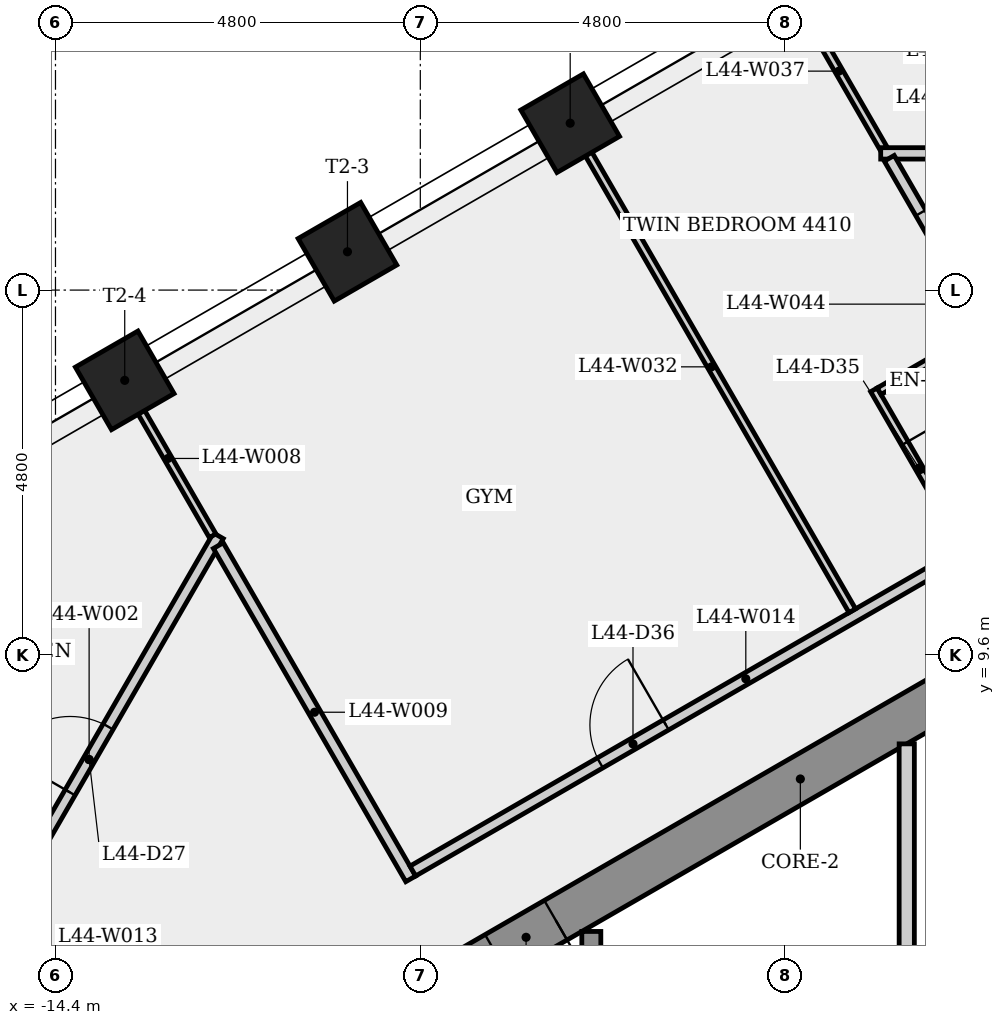
"""IFC4 building model, lengths in metres.
Left out: names, types, materials, properties, quantities, classifications, styles, units other than length and angle.
Written with IfcOpenShell. Run it as: python <this file> out.ifc"""

import sys

from ifc_helpers import new_model, si_unit, direction, frame, frame_2d, origin, origin_2d, place, context, subcontext, project, spatial, rectangle, extrude, element, fill, save


model = new_model("IFC4")
c1 = context("Model", 3, precision=1e-05, world=origin(), true_north=direction((0.0, 1.0)))
c2 = subcontext(c1, "Body", "Model", "MODEL_VIEW")
j1 = project(units=[si_unit("LENGTHUNIT", "METRE"), si_unit("PLANEANGLEUNIT", "RADIAN")], contexts=[c1])
p1 = place(None, origin())
s1 = spatial("IfcSite", under=j1, at=p1, CompositionType="ELEMENT")
p2 = place(p1, origin())
s2 = spatial("IfcBuilding", under=s1, at=p2, CompositionType="ELEMENT")
p3 = place(p2, frame((0.0, 0.0, 166.3)))
s3 = spatial("IfcBuildingStorey", under=s2, at=p3, CompositionType="ELEMENT", Elevation=166.3)
p4 = place(p3, frame((0.15, 10.71, 0.0), z_axis=(0.0, 0.0, 1.0), x_axis=(-0.866023993627, -0.500002442456, 0.0)))
e1 = element("IfcWall", 1, at=p4, inside=s3, PredefinedType="SHEAR", context=c2, shape_type="SweptSolid", body=[
    extrude(rectangle(XDim=10.97, YDim=0.6, at=frame_2d((5.485, 0.0))), origin(), (0.0, 0.0, 1.0), 3.4),
])
p5 = place(p4, frame((9.201, 0.0, 0.0)))
e2 = element("IfcOpeningElement", 2, at=p5, cuts=e1, PredefinedType="OPENING", context=c2, shape_type="SweptSolid", body=[
    extrude(rectangle(XDim=0.9, YDim=2.1, at=frame_2d((0.45, 1.05))), frame((0.0, 0.31, 0.0), z_axis=(0.0, -1.0, 0.0), x_axis=(1.0, 0.0, 0.0)), (0.0, 0.0, 1.0), 0.62),
])
p6 = place(p4, frame((1.744, 0.0, 0.0)))
e3 = element("IfcOpeningElement", 3, at=p6, cuts=e1, PredefinedType="OPENING", context=c2, shape_type="SweptSolid", body=[
    extrude(rectangle(XDim=0.9, YDim=2.1, at=frame_2d((0.45, 1.05))), frame((0.0, 0.31, 0.0), z_axis=(0.0, -1.0, 0.0), x_axis=(1.0, 0.0, 0.0)), (0.0, 0.0, 1.0), 0.62),
])
for number, where, z_axis, x_axis in (
    (4, (-7.628, 16.596, 0.0), (0.0, 0.0, 1.0), (-0.5, 0.866, 0.0)),
    (5, (-10.559, 14.904, 0.0), (0.0, 0.0, 1.0), (-0.5, 0.866, 0.0)),
    (6, (-13.489, 13.212, 0.0), (0.0, 0.0, 1.0), (-0.5, 0.866, 0.0)),
):
    element("IfcColumn", number, at=place(p3, frame(where, z_axis=z_axis, x_axis=x_axis)), inside=s3, PredefinedType="COLUMN", context=c2, shape_type="SweptSolid", body=[
        extrude(rectangle(XDim=0.95, YDim=0.95, at=origin_2d()), origin(), (0.0, 0.0, 1.0), 3.4),
    ])
p7 = place(p3, frame((-15.657, 5.278, 0.0), z_axis=(0.0, 0.0, 1.0), x_axis=(0.499988676607, 0.86603194125, 0.0)))
e7 = element("IfcWall", 7, at=p7, inside=s3, PredefinedType="PARTITIONING", context=c2, shape_type="SweptSolid", body=[
    extrude(rectangle(XDim=6.801, YDim=0.15, at=frame_2d((3.4, 0.0))), origin(), (0.0, 0.0, 1.0), 3.05),
])
p8 = place(p7, frame((2.9, 0.0, 0.0)))
e8 = element("IfcOpeningElement", 8, at=p8, cuts=e7, PredefinedType="OPENING", context=c2, shape_type="SweptSolid", body=[
    extrude(rectangle(XDim=1.0, YDim=2.1, at=frame_2d((0.5, 1.05))), frame((0.0, 0.085, 0.0), z_axis=(0.0, -1.0, 0.0), x_axis=(1.0, 0.0, 0.0)), (0.0, 0.0, 1.0), 0.17),
])
p9 = place(p3, frame((-13.507, 13.202, 0.0), z_axis=(0.0, 0.0, 1.0), x_axis=(0.499995339376, -0.86602809458, 0.0)))
e9 = element("IfcWall", 9, at=p9, inside=s3, PredefinedType="PARTITIONING", context=c2, shape_type="SweptSolid", body=[
    extrude(rectangle(XDim=2.349, YDim=0.1, at=frame_2d((1.175, 0.0))), origin(), (0.0, 0.0, 1.0), 3.05),
])
p10 = place(p3, frame((-12.257, 11.038, 0.0), z_axis=(0.0, 0.0, 1.0), x_axis=(0.499997969693, -0.866026575979, 0.0)))
e10 = element("IfcWall", 10, at=p10, inside=s3, PredefinedType="PARTITIONING", context=c2, shape_type="SweptSolid", body=[
    extrude(rectangle(XDim=5.062, YDim=0.15, at=frame_2d((2.531, 0.0))), origin(), (0.0, 0.0, 1.0), 3.05),
])
p11 = place(p3, frame((-9.698, 6.756, 0.0), z_axis=(0.0, 0.0, 1.0), x_axis=(0.866026460776, 0.499998169232, 0.0)))
e11 = element("IfcWall", 11, at=p11, inside=s3, PredefinedType="PARTITIONING", context=c2, shape_type="SweptSolid", body=[
    extrude(rectangle(XDim=10.118, YDim=0.15, at=frame_2d((5.059, 0.0))), origin(), (0.0, 0.0, 1.0), 3.05),
])
p12 = place(p11, frame((2.845, 0.0, 0.0)))
e12 = element("IfcOpeningElement", 12, at=p12, cuts=e11, PredefinedType="OPENING", context=c2, shape_type="SweptSolid", body=[
    extrude(rectangle(XDim=1.0, YDim=2.1, at=frame_2d((0.5, 1.05))), frame((0.0, 0.085, 0.0), z_axis=(0.0, -1.0, 0.0), x_axis=(1.0, 0.0, 0.0)), (0.0, 0.0, 1.0), 0.17),
])
p13 = place(p3, frame((-7.35, 1.925, 0.0), z_axis=(0.0, 0.0, 1.0), x_axis=(0.0, 1.0, 0.0)))
e13 = element("IfcWall", 13, at=p13, inside=s3, PredefinedType="SHEAR", context=c2, shape_type="SweptSolid", body=[
    extrude(rectangle(XDim=4.036, YDim=0.25, at=frame_2d((2.018, 0.0))), origin(), (0.0, 0.0, 1.0), 3.05),
])
p14 = place(p3, frame((-3.916, 10.181, 0.0), z_axis=(0.0, 0.0, 1.0), x_axis=(-0.500011399757, 0.866018822032, 0.0)))
e14 = element("IfcWall", 14, at=p14, inside=s3, PredefinedType="PARTITIONING", context=c2, shape_type="SweptSolid", body=[
    extrude(rectangle(XDim=7.411, YDim=0.1, at=frame_2d((3.706, 0.0))), origin(), (0.0, 0.0, 1.0), 3.05),
])
p15 = place(p3, frame((-3.632, 13.088, 0.0), z_axis=(0.0, 0.0, 1.0), x_axis=(0.499986429846, -0.866033238375, 0.0)))
e15 = element("IfcWall", 15, at=p15, inside=s3, PredefinedType="PARTITIONING", context=c2, shape_type="SweptSolid", body=[
    extrude(rectangle(XDim=2.375, YDim=0.1, at=frame_2d((1.188, 0.0))), origin(), (0.0, 0.0, 1.0), 3.05),
])
p16 = place(p15, frame((0.812, 0.0, 0.0)))
e16 = element("IfcOpeningElement", 16, at=p16, cuts=e15, PredefinedType="OPENING", context=c2, shape_type="SweptSolid", body=[
    extrude(rectangle(XDim=0.8, YDim=2.1, at=frame_2d((0.4, 1.05))), frame((0.0, 0.06, 0.0), z_axis=(0.0, -1.0, 0.0), x_axis=(1.0, 0.0, 0.0)), (0.0, 0.0, 1.0), 0.12),
])
p17 = place(p3, frame((-3.505, 16.264, 0.0), z_axis=(0.0, 0.0, 1.0), x_axis=(-0.500040344412, 0.866002109674, 0.0)))
e17 = element("IfcWall", 17, at=p17, inside=s3, PredefinedType="PARTITIONING", context=c2, shape_type="SweptSolid", body=[
    extrude(rectangle(XDim=2.349, YDim=0.1, at=frame_2d((1.174, 0.0))), origin(), (0.0, 0.0, 1.0), 3.05),
])
p18 = place(p3, frame((-3.543, 16.199, 0.0), z_axis=(0.0, 0.0, 1.0), x_axis=(1.0, 0.0, 0.0)))
e18 = element("IfcWall", 18, at=p18, inside=s3, PredefinedType="PARTITIONING", context=c2, shape_type="SweptSolid", body=[
    extrude(rectangle(XDim=4.656, YDim=0.15, at=frame_2d((2.328, 0.0))), origin(), (0.0, 0.0, 1.0), 3.05),
])
p19 = place(p18, frame((1.845, 0.0, 0.0)))
e19 = element("IfcOpeningElement", 19, at=p19, cuts=e18, PredefinedType="OPENING", context=c2, shape_type="SweptSolid", body=[
    extrude(rectangle(XDim=1.0, YDim=2.1, at=frame_2d((0.5, 1.05))), frame((0.0, 0.085, 0.0), z_axis=(0.0, -1.0, 0.0), x_axis=(1.0, 0.0, 0.0)), (0.0, 0.0, 1.0), 0.17),
])
p20 = place(p3, frame((-3.2, 8.429, 0.0), z_axis=(0.0, 0.0, 1.0), x_axis=(0.0, -1.0, 0.0)))
e20 = element("IfcWall", 20, at=p20, inside=s3, PredefinedType="PARTITIONING", context=c2, shape_type="SweptSolid", body=[
    extrude(rectangle(XDim=3.154, YDim=0.2, at=frame_2d((1.577, 0.0))), origin(), (0.0, 0.0, 1.0), 3.05),
])
p21 = place(p3, frame((-2.201, 13.856, 0.0), z_axis=(0.0, 0.0, 1.0), x_axis=(-0.865989086347, -0.500062898373, 0.0)))
e21 = element("IfcWall", 21, at=p21, inside=s3, PredefinedType="PARTITIONING", context=c2, shape_type="SweptSolid", body=[
    extrude(rectangle(XDim=1.573, YDim=0.1, at=frame_2d((0.786, 0.0))), origin(), (0.0, 0.0, 1.0), 3.05),
])
p22 = place(p3, frame((-3.43, 16.134, 0.0), z_axis=(0.0, 0.0, 1.0), x_axis=(0.50000861454, -0.86602043012, 0.0)))
e22 = element("IfcWall", 22, at=p22, inside=s3, PredefinedType="PARTITIONING", context=c2, shape_type="SweptSolid", body=[
    extrude(rectangle(XDim=4.431, YDim=0.15, at=frame_2d((2.216, 0.0))), origin(), (0.0, 0.0, 1.0), 3.05),
])
p23 = place(p22, frame((0.829, 0.0, 0.0)))
e23 = element("IfcOpeningElement", 23, at=p23, cuts=e22, PredefinedType="OPENING", context=c2, shape_type="SweptSolid", body=[
    extrude(rectangle(XDim=0.9, YDim=2.1, at=frame_2d((0.45, 1.05))), frame((0.0, 0.085, 0.0), z_axis=(0.0, -1.0, 0.0), x_axis=(1.0, 0.0, 0.0)), (0.0, 0.0, 1.0), 0.17),
])
p24 = place(p8, origin())
e24 = element("IfcDoor", 24, at=p24, inside=s3, OperationType="SINGLE_SWING_LEFT", PredefinedType="DOOR", context=c2, shape_type="SweptSolid", body=[
    extrude(rectangle(XDim=1.0, YDim=2.1, at=frame_2d((0.5, 1.05))), frame((0.0, 0.025, 0.0), z_axis=(0.0, -1.0, 0.0), x_axis=(1.0, 0.0, 0.0)), (0.0, 0.0, 1.0), 0.05),
])
fill(e8, e24)
p25 = place(p23, origin())
e25 = element("IfcDoor", 25, at=p25, inside=s3, OperationType="SINGLE_SWING_RIGHT", PredefinedType="DOOR", context=c2, shape_type="SweptSolid", body=[
    extrude(rectangle(XDim=0.9, YDim=2.1, at=frame_2d((0.45, 1.05))), frame((0.0, 0.025, 0.0), z_axis=(0.0, -1.0, 0.0), x_axis=(1.0, 0.0, 0.0)), (0.0, 0.0, 1.0), 0.05),
])
fill(e23, e25)
p26 = place(p16, origin())
e26 = element("IfcDoor", 26, at=p26, inside=s3, OperationType="SINGLE_SWING_LEFT", PredefinedType="DOOR", context=c2, shape_type="SweptSolid", body=[
    extrude(rectangle(XDim=0.8, YDim=2.1, at=frame_2d((0.4, 1.05))), frame((0.0, 0.025, 0.0), z_axis=(0.0, -1.0, 0.0), x_axis=(1.0, 0.0, 0.0)), (0.0, 0.0, 1.0), 0.05),
])
fill(e16, e26)
p27 = place(p12, origin())
e27 = element("IfcDoor", 27, at=p27, inside=s3, OperationType="SINGLE_SWING_RIGHT", PredefinedType="DOOR", context=c2, shape_type="SweptSolid", body=[
    extrude(rectangle(XDim=1.0, YDim=2.1, at=frame_2d((0.5, 1.05))), frame((0.0, 0.025, 0.0), z_axis=(0.0, -1.0, 0.0), x_axis=(1.0, 0.0, 0.0)), (0.0, 0.0, 1.0), 0.05),
])
fill(e12, e27)
p28 = place(p5, origin())
e28 = element("IfcDoor", 28, at=p28, inside=s3, OperationType="SINGLE_SWING_LEFT", PredefinedType="DOOR", context=c2, shape_type="SweptSolid", body=[
    extrude(rectangle(XDim=0.9, YDim=2.1, at=frame_2d((0.45, 1.05))), frame((0.0, 0.025, 0.0), z_axis=(0.0, -1.0, 0.0), x_axis=(1.0, 0.0, 0.0)), (0.0, 0.0, 1.0), 0.05),
])
fill(e2, e28)
save(model, sys.argv[1])
